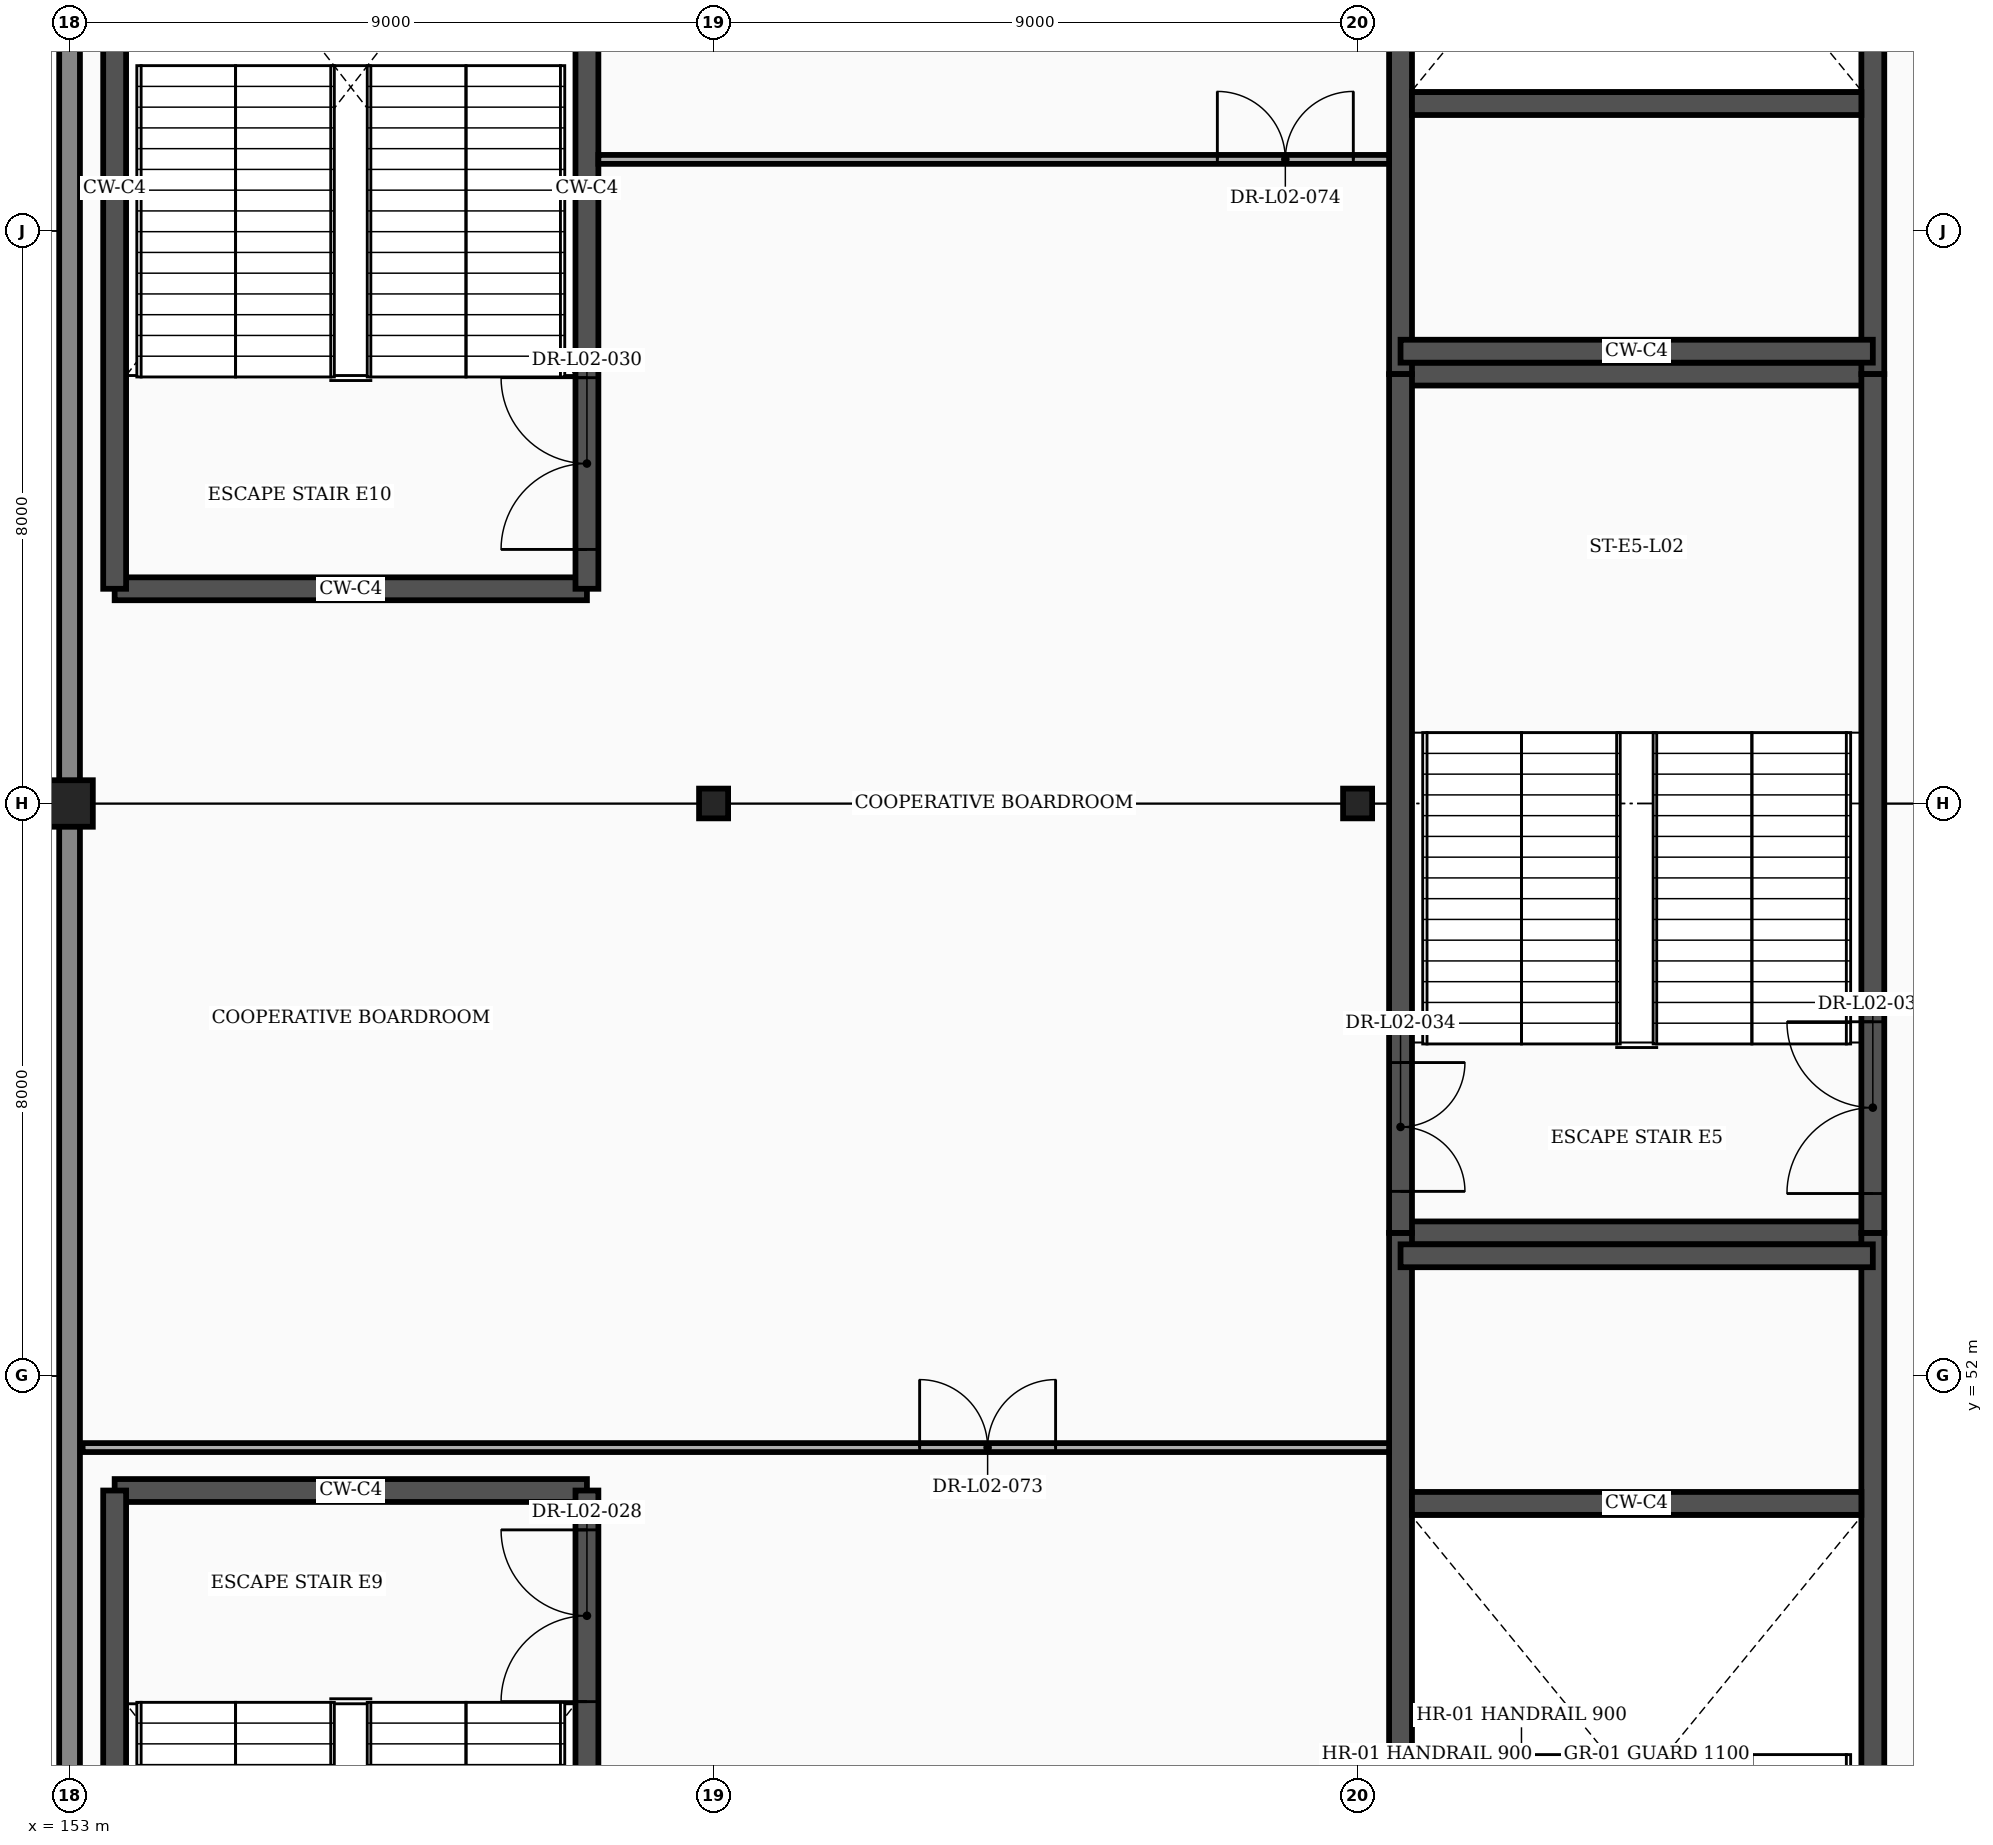
"""IFC4 building model, lengths in metres.
Left out: names, types, materials, properties, quantities, classifications, styles, units other than length and angle.
Written with IfcOpenShell. Run it as: python <this file> out.ifc"""

import sys

from ifc_helpers import new_model, si_unit, direction, frame, frame_2d, origin, origin_2d, place, context, subcontext, project, spatial, rectangle, i_section, extrude, element, fill, save


model = new_model("IFC4")
c1 = context("Model", 3, precision=1e-05, world=origin(), true_north=direction((0.0, 1.0)))
c2 = subcontext(c1, "Body", "Model", "MODEL_VIEW")
j1 = project(units=[si_unit("LENGTHUNIT", "METRE"), si_unit("PLANEANGLEUNIT", "RADIAN")], contexts=[c1])
p1 = place(None, origin())
s1 = spatial("IfcSite", under=j1, at=p1, CompositionType="ELEMENT")
p2 = place(p1, origin())
s2 = spatial("IfcBuilding", under=s1, at=p2, CompositionType="ELEMENT")
p3 = place(p2, frame((0.0, 0.0, 11.4)))
s3 = spatial("IfcBuildingStorey", under=s2, at=p3, CompositionType="ELEMENT", Elevation=11.4)
p4 = place(p3, frame((153.0, 60.0, 0.0), z_axis=(0.0, 0.0, 1.0), x_axis=(1.0, 0.0, 0.0)))
e1 = element("IfcColumn", 1, at=p4, inside=s3, PredefinedType="COLUMN", context=c2, shape_type="SweptSolid", body=[
    extrude(rectangle(XDim=0.65, YDim=0.65, at=origin_2d()), origin(), (0.0, 0.0, 1.0), 5.4),
])
for number, where, z_axis, x_axis in (
    (2, (171.0, 60.0, 0.0), (0.0, 0.0, 1.0), (1.0, 0.0, 0.0)),
    (3, (162.0, 60.0, 0.0), (0.0, 0.0, 1.0), (1.0, 0.0, 0.0)),
):
    element("IfcColumn", number, at=place(p3, frame(where, z_axis=z_axis, x_axis=x_axis)), inside=s3, PredefinedType="COLUMN", context=c2, shape_type="SweptSolid", body=[
        extrude(i_section(OverallWidth=0.406, OverallDepth=0.416, WebThickness=0.03, FlangeThickness=0.048, at=origin_2d()), origin(), (0.0, 0.0, 1.0), 5.4),
    ])
for number, where, z_axis, x_axis in (
    (4, (153.0, 36.198, 0.0), (0.0, 0.0, 1.0), (0.0, 1.0, 0.0)),
    (5, (153.0, 60.317, 0.0), (0.0, 0.0, 1.0), (0.0, 1.0, 0.0)),
):
    element("IfcWall", number, at=place(p3, frame(where, z_axis=z_axis, x_axis=x_axis)), inside=s3, PredefinedType="STANDARD", context=c2, shape_type="SweptSolid", body=[
        extrude(rectangle(XDim=23.485, YDim=0.29, at=frame_2d((11.742, 0.0))), origin(), (0.0, 0.0, 1.0), 4.467),
    ])
p5 = place(p3, frame((171.6, 54.0, 0.0), z_axis=(0.0, 0.0, 1.0), x_axis=(1.0, 0.0, 0.0)))
e6 = element("IfcWall", 6, at=p5, inside=s3, PredefinedType="SHEAR", context=c2, shape_type="SweptSolid", body=[
    extrude(rectangle(XDim=6.6, YDim=0.32, at=frame_2d((3.3, 0.0))), origin(), (0.0, 0.0, 1.0), 5.15),
])
p6 = place(p3, frame((171.6, 39.4, 0.0), z_axis=(0.0, 0.0, 1.0), x_axis=(0.0, 1.0, 0.0)))
e7 = element("IfcWall", 7, at=p6, inside=s3, PredefinedType="SHEAR", context=c2, shape_type="SweptSolid", body=[
    extrude(rectangle(XDim=14.6, YDim=0.32, at=frame_2d((7.3, 0.0))), origin(), (0.0, 0.0, 1.0), 5.15),
])
p7 = place(p3, frame((178.2, 39.4, 0.0), z_axis=(0.0, 0.0, 1.0), x_axis=(0.0, 1.0, 0.0)))
e8 = element("IfcWall", 8, at=p7, inside=s3, PredefinedType="SHEAR", context=c2, shape_type="SweptSolid", body=[
    extrude(rectangle(XDim=14.6, YDim=0.32, at=frame_2d((7.3, 0.0))), origin(), (0.0, 0.0, 1.0), 5.15),
])
p8 = place(p7, frame((0.55, 0.0, 0.0)))
e9 = element("IfcOpeningElement", 9, at=p8, cuts=e8, PredefinedType="OPENING", context=c2, shape_type="SweptSolid", body=[
    extrude(rectangle(XDim=2.4, YDim=2.25, at=frame_2d((1.2, 1.125))), frame((0.0, 0.172, 0.0), z_axis=(0.0, -1.0, 0.0), x_axis=(1.0, 0.0, 0.0)), (0.0, 0.0, 1.0), 0.344),
])
p9 = place(p3, frame((171.76, 50.22, 0.0), z_axis=(0.0, 0.0, 1.0), x_axis=(1.0, 0.0, 0.0)))
e10 = element("IfcWall", 10, at=p9, inside=s3, PredefinedType="SHEAR", context=c2, shape_type="SweptSolid", body=[
    extrude(rectangle(XDim=6.28, YDim=0.32, at=frame_2d((3.14, 0.0))), origin(), (0.0, 0.0, 1.0), 5.15),
])
p10 = place(p3, frame((171.6, 66.0, 0.0), z_axis=(0.0, 0.0, 1.0), x_axis=(1.0, 0.0, 0.0)))
e11 = element("IfcWall", 11, at=p10, inside=s3, PredefinedType="SHEAR", context=c2, shape_type="SweptSolid", body=[
    extrude(rectangle(XDim=6.6, YDim=0.32, at=frame_2d((3.3, 0.0))), origin(), (0.0, 0.0, 1.0), 5.15),
])
p11 = place(p3, frame((171.6, 66.0, 0.0), z_axis=(0.0, 0.0, 1.0), x_axis=(0.0, 1.0, 0.0)))
e12 = element("IfcWall", 12, at=p11, inside=s3, PredefinedType="SHEAR", context=c2, shape_type="SweptSolid", body=[
    extrude(rectangle(XDim=14.6, YDim=0.32, at=frame_2d((7.3, 0.0))), origin(), (0.0, 0.0, 1.0), 5.15),
])
p12 = place(p3, frame((178.2, 66.0, 0.0), z_axis=(0.0, 0.0, 1.0), x_axis=(0.0, 1.0, 0.0)))
e13 = element("IfcWall", 13, at=p12, inside=s3, PredefinedType="SHEAR", context=c2, shape_type="SweptSolid", body=[
    extrude(rectangle(XDim=14.6, YDim=0.32, at=frame_2d((7.3, 0.0))), origin(), (0.0, 0.0, 1.0), 5.15),
])
p13 = place(p12, frame((11.65, 0.0, 0.0)))
e14 = element("IfcOpeningElement", 14, at=p13, cuts=e13, PredefinedType="OPENING", context=c2, shape_type="SweptSolid", body=[
    extrude(rectangle(XDim=2.4, YDim=2.25, at=frame_2d((1.2, 1.125))), frame((0.0, 0.172, 0.0), z_axis=(0.0, -1.0, 0.0), x_axis=(1.0, 0.0, 0.0)), (0.0, 0.0, 1.0), 0.344),
])
p14 = place(p3, frame((171.76, 69.78, 0.0), z_axis=(0.0, 0.0, 1.0), x_axis=(1.0, 0.0, 0.0)))
e15 = element("IfcWall", 15, at=p14, inside=s3, PredefinedType="SHEAR", context=c2, shape_type="SweptSolid", body=[
    extrude(rectangle(XDim=6.28, YDim=0.32, at=frame_2d((3.14, 0.0))), origin(), (0.0, 0.0, 1.0), 5.15),
])
p15 = place(p3, frame((153.63, 50.4, 0.0), z_axis=(0.0, 0.0, 1.0), x_axis=(1.0, 0.0, 0.0)))
e16 = element("IfcWall", 16, at=p15, inside=s3, PredefinedType="SHEAR", context=c2, shape_type="SweptSolid", body=[
    extrude(rectangle(XDim=6.6, YDim=0.32, at=frame_2d((3.3, 0.0))), origin(), (0.0, 0.0, 1.0), 5.15),
])
p16 = place(p3, frame((153.63, 39.2, 0.0), z_axis=(0.0, 0.0, 1.0), x_axis=(0.0, 1.0, 0.0)))
e17 = element("IfcWall", 17, at=p16, inside=s3, PredefinedType="SHEAR", context=c2, shape_type="SweptSolid", body=[
    extrude(rectangle(XDim=11.2, YDim=0.32, at=frame_2d((5.6, 0.0))), origin(), (0.0, 0.0, 1.0), 5.15),
])
p17 = place(p3, frame((160.23, 39.2, 0.0), z_axis=(0.0, 0.0, 1.0), x_axis=(0.0, 1.0, 0.0)))
e18 = element("IfcWall", 18, at=p17, inside=s3, PredefinedType="SHEAR", context=c2, shape_type="SweptSolid", body=[
    extrude(rectangle(XDim=11.2, YDim=0.32, at=frame_2d((5.6, 0.0))), origin(), (0.0, 0.0, 1.0), 5.15),
])
p18 = place(p17, frame((8.25, 0.0, 0.0)))
e19 = element("IfcOpeningElement", 19, at=p18, cuts=e18, PredefinedType="OPENING", context=c2, shape_type="SweptSolid", body=[
    extrude(rectangle(XDim=2.4, YDim=2.25, at=frame_2d((1.2, 1.125))), frame((0.0, 0.172, 0.0), z_axis=(0.0, -1.0, 0.0), x_axis=(1.0, 0.0, 0.0)), (0.0, 0.0, 1.0), 0.344),
])
p19 = place(p3, frame((153.63, 63.0, 0.0), z_axis=(0.0, 0.0, 1.0), x_axis=(1.0, 0.0, 0.0)))
e20 = element("IfcWall", 20, at=p19, inside=s3, PredefinedType="SHEAR", context=c2, shape_type="SweptSolid", body=[
    extrude(rectangle(XDim=6.6, YDim=0.32, at=frame_2d((3.3, 0.0))), origin(), (0.0, 0.0, 1.0), 5.15),
])
p20 = place(p3, frame((153.63, 63.0, 0.0), z_axis=(0.0, 0.0, 1.0), x_axis=(0.0, 1.0, 0.0)))
e21 = element("IfcWall", 21, at=p20, inside=s3, PredefinedType="SHEAR", context=c2, shape_type="SweptSolid", body=[
    extrude(rectangle(XDim=11.2, YDim=0.32, at=frame_2d((5.6, 0.0))), origin(), (0.0, 0.0, 1.0), 5.15),
])
p21 = place(p3, frame((160.23, 63.0, 0.0), z_axis=(0.0, 0.0, 1.0), x_axis=(0.0, 1.0, 0.0)))
e22 = element("IfcWall", 22, at=p21, inside=s3, PredefinedType="SHEAR", context=c2, shape_type="SweptSolid", body=[
    extrude(rectangle(XDim=11.2, YDim=0.32, at=frame_2d((5.6, 0.0))), origin(), (0.0, 0.0, 1.0), 5.15),
])
p22 = place(p21, frame((0.55, 0.0, 0.0)))
e23 = element("IfcOpeningElement", 23, at=p22, cuts=e22, PredefinedType="OPENING", context=c2, shape_type="SweptSolid", body=[
    extrude(rectangle(XDim=2.4, YDim=2.25, at=frame_2d((1.2, 1.125))), frame((0.0, 0.172, 0.0), z_axis=(0.0, -1.0, 0.0), x_axis=(1.0, 0.0, 0.0)), (0.0, 0.0, 1.0), 0.344),
])
for number, where, z_axis, x_axis in (
    (24, (171.6, 53.68, 0.0), (0.0, 0.0, 1.0), (1.0, 0.0, 0.0)),
    (25, (171.6, 66.32, 0.0), (0.0, 0.0, 1.0), (1.0, 0.0, 0.0)),
):
    element("IfcWall", number, at=place(p3, frame(where, z_axis=z_axis, x_axis=x_axis)), inside=s3, PredefinedType="SHEAR", context=c2, shape_type="SweptSolid", body=[
        extrude(rectangle(XDim=6.6, YDim=0.32, at=frame_2d((3.3, 0.0))), origin(), (0.0, 0.0, 1.0), 5.15),
    ])
p23 = place(p3, frame((171.6, 54.0, 0.0), z_axis=(0.0, 0.0, 1.0), x_axis=(0.0, 1.0, 0.0)))
e26 = element("IfcWall", 26, at=p23, inside=s3, PredefinedType="SHEAR", context=c2, shape_type="SweptSolid", body=[
    extrude(rectangle(XDim=12.0, YDim=0.32, at=frame_2d((6.0, 0.0))), origin(), (0.0, 0.0, 1.0), 5.15),
])
p24 = place(p23, frame((0.58, 0.0, 0.0)))
e27 = element("IfcOpeningElement", 27, at=p24, cuts=e26, PredefinedType="OPENING", context=c2, shape_type="SweptSolid", body=[
    extrude(rectangle(XDim=1.8, YDim=2.25, at=frame_2d((0.9, 1.125))), frame((0.0, 0.172, 0.0), z_axis=(0.0, -1.0, 0.0), x_axis=(1.0, 0.0, 0.0)), (0.0, 0.0, 1.0), 0.344),
])
p25 = place(p3, frame((178.2, 54.0, 0.0), z_axis=(0.0, 0.0, 1.0), x_axis=(0.0, 1.0, 0.0)))
e28 = element("IfcWall", 28, at=p25, inside=s3, PredefinedType="SHEAR", context=c2, shape_type="SweptSolid", body=[
    extrude(rectangle(XDim=12.0, YDim=0.32, at=frame_2d((6.0, 0.0))), origin(), (0.0, 0.0, 1.0), 5.15),
])
p26 = place(p25, frame((0.55, 0.0, 0.0)))
e29 = element("IfcOpeningElement", 29, at=p26, cuts=e28, PredefinedType="OPENING", context=c2, shape_type="SweptSolid", body=[
    extrude(rectangle(XDim=2.4, YDim=2.25, at=frame_2d((1.2, 1.125))), frame((0.0, 0.172, 0.0), z_axis=(0.0, -1.0, 0.0), x_axis=(1.0, 0.0, 0.0)), (0.0, 0.0, 1.0), 0.344),
])
p27 = place(p3, frame((153.183, 51.0, 0.0), z_axis=(0.0, 0.0, 1.0), x_axis=(1.0, 0.0, 0.0)))
e30 = element("IfcWall", 30, at=p27, inside=s3, PredefinedType="PARTITIONING", context=c2, shape_type="SweptSolid", body=[
    extrude(rectangle(XDim=18.257, YDim=0.125, at=frame_2d((9.129, 0.0))), origin(), (0.0, 0.0, 1.0), 5.15),
])
p28 = place(p27, frame((11.697, 0.0, 0.0)))
e31 = element("IfcOpeningElement", 31, at=p28, cuts=e30, PredefinedType="OPENING", context=c2, shape_type="SweptSolid", body=[
    extrude(rectangle(XDim=1.9, YDim=2.35, at=frame_2d((0.95, 1.175))), frame((0.0, 0.074, 0.0), z_axis=(0.0, -1.0, 0.0), x_axis=(1.0, 0.0, 0.0)), (0.0, 0.0, 1.0), 0.149),
])
p29 = place(p3, frame((160.39, 69.0, 0.0), z_axis=(0.0, 0.0, 1.0), x_axis=(1.0, 0.0, 0.0)))
e32 = element("IfcWall", 32, at=p29, inside=s3, PredefinedType="PARTITIONING", context=c2, shape_type="SweptSolid", body=[
    extrude(rectangle(XDim=11.05, YDim=0.125, at=frame_2d((5.525, 0.0))), origin(), (0.0, 0.0, 1.0), 5.15),
])
p30 = place(p29, frame((8.65, 0.0, 0.0)))
e33 = element("IfcOpeningElement", 33, at=p30, cuts=e32, PredefinedType="OPENING", context=c2, shape_type="SweptSolid", body=[
    extrude(rectangle(XDim=1.9, YDim=2.35, at=frame_2d((0.95, 1.175))), frame((0.0, 0.074, 0.0), z_axis=(0.0, -1.0, 0.0), x_axis=(1.0, 0.0, 0.0)), (0.0, 0.0, 1.0), 0.149),
])
p31 = place(p18, origin())
e34 = element("IfcDoor", 34, at=p31, inside=s3, OperationType="DOUBLE_DOOR_SINGLE_SWING", PredefinedType="DOOR", context=c2, shape_type="SweptSolid", body=[
    extrude(rectangle(XDim=2.4, YDim=2.25, at=frame_2d((1.2, 1.125))), frame((0.0, 0.025, 0.0), z_axis=(0.0, -1.0, 0.0), x_axis=(1.0, 0.0, 0.0)), (0.0, 0.0, 1.0), 0.05),
])
fill(e19, e34)
p32 = place(p22, origin())
e35 = element("IfcDoor", 35, at=p32, inside=s3, OperationType="DOUBLE_DOOR_SINGLE_SWING", PredefinedType="DOOR", context=c2, shape_type="SweptSolid", body=[
    extrude(rectangle(XDim=2.4, YDim=2.25, at=frame_2d((1.2, 1.125))), frame((0.0, 0.025, 0.0), z_axis=(0.0, -1.0, 0.0), x_axis=(1.0, 0.0, 0.0)), (0.0, 0.0, 1.0), 0.05),
])
fill(e23, e35)
p33 = place(p26, origin())
e36 = element("IfcDoor", 36, at=p33, inside=s3, OperationType="DOUBLE_DOOR_SINGLE_SWING", PredefinedType="DOOR", context=c2, shape_type="SweptSolid", body=[
    extrude(rectangle(XDim=2.4, YDim=2.25, at=frame_2d((1.2, 1.125))), frame((0.0, 0.025, 0.0), z_axis=(0.0, -1.0, 0.0), x_axis=(1.0, 0.0, 0.0)), (0.0, 0.0, 1.0), 0.05),
])
fill(e29, e36)
p34 = place(p24, frame((1.8, 0.0, 0.0), z_axis=(0.0, 0.0, 1.0), x_axis=(-1.0, 0.0, 0.0)))
e37 = element("IfcDoor", 37, at=p34, inside=s3, OperationType="DOUBLE_DOOR_SINGLE_SWING", PredefinedType="DOOR", context=c2, shape_type="SweptSolid", body=[
    extrude(rectangle(XDim=1.8, YDim=2.25, at=frame_2d((0.9, 1.125))), frame((0.0, 0.025, 0.0), z_axis=(0.0, -1.0, 0.0), x_axis=(1.0, 0.0, 0.0)), (0.0, 0.0, 1.0), 0.05),
])
fill(e27, e37)
p35 = place(p28, origin())
e38 = element("IfcDoor", 38, at=p35, inside=s3, OperationType="DOUBLE_DOOR_SINGLE_SWING", PredefinedType="DOOR", context=c2, shape_type="SweptSolid", body=[
    extrude(rectangle(XDim=1.9, YDim=2.35, at=frame_2d((0.95, 1.175))), frame((0.0, 0.025, 0.0), z_axis=(0.0, -1.0, 0.0), x_axis=(1.0, 0.0, 0.0)), (0.0, 0.0, 1.0), 0.05),
])
fill(e31, e38)
p36 = place(p30, origin())
e39 = element("IfcDoor", 39, at=p36, inside=s3, OperationType="DOUBLE_DOOR_SINGLE_SWING", PredefinedType="DOOR", context=c2, shape_type="SweptSolid", body=[
    extrude(rectangle(XDim=1.9, YDim=2.35, at=frame_2d((0.95, 1.175))), frame((0.0, 0.025, 0.0), z_axis=(0.0, -1.0, 0.0), x_axis=(1.0, 0.0, 0.0)), (0.0, 0.0, 1.0), 0.05),
])
fill(e33, e39)
save(model, sys.argv[1])
